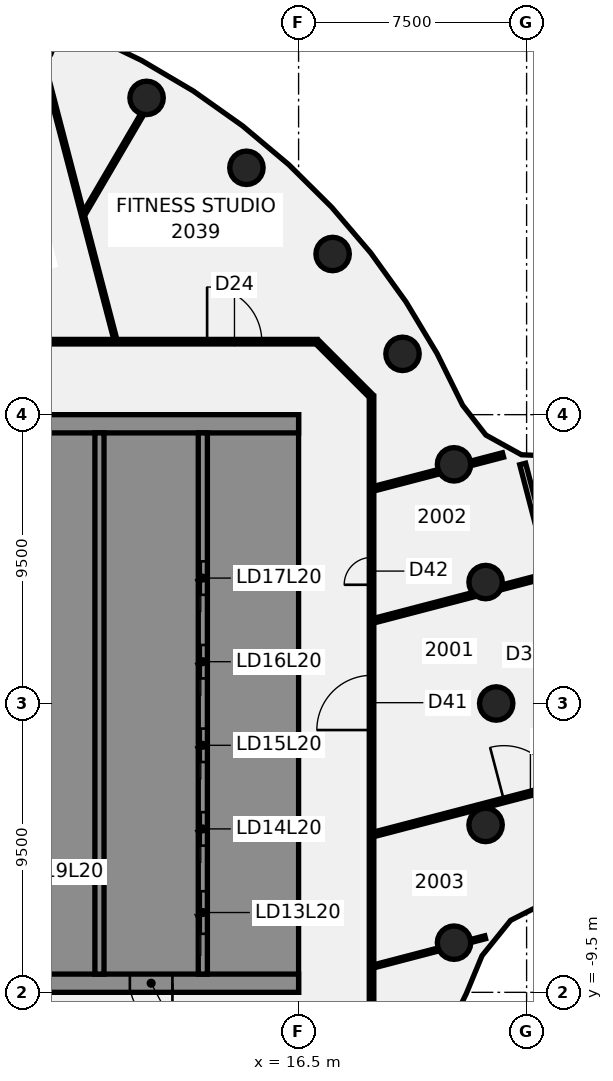
"""IFC4 building model, lengths in metres.
Left out: names, types, materials, properties, quantities, classifications, styles, units other than length and angle.
Written with IfcOpenShell. Run it as: python <this file> out.ifc"""

import sys

from ifc_helpers import new_model, si_unit, direction, frame, frame_2d, origin, origin_2d, place, context, subcontext, project, spatial, polyline, rectangle, circle, outline, extrude, element, fill, save


model = new_model("IFC4")
c1 = context("Model", 3, precision=1e-05, world=origin(), true_north=direction((0.0, 1.0)))
c2 = subcontext(c1, "Body", "Model", "MODEL_VIEW")
j1 = project(units=[si_unit("LENGTHUNIT", "METRE"), si_unit("PLANEANGLEUNIT", "RADIAN")], contexts=[c1])
p1 = place(None, origin())
s1 = spatial("IfcSite", under=j1, at=p1, CompositionType="ELEMENT")
p2 = place(p1, origin())
s2 = spatial("IfcBuilding", under=s1, at=p2, CompositionType="ELEMENT")
p3 = place(p2, frame((0.0, 0.0, 87.25)))
s3 = spatial("IfcBuildingStorey", under=s2, at=p3, CompositionType="ELEMENT", Elevation=87.25)
for number, where, z_axis, x_axis in (
    (1, (23.0, 0.0, -0.14), (0.0, 0.0, 1.0), (1.0, 0.0, 0.0)),
    (2, (22.651, 3.994, -0.14), (0.0, 0.0, 1.0), (1.0, 0.0, 0.0)),
    (3, (21.613, 7.866, -0.14), (0.0, 0.0, 1.0), (1.0, 0.0, 0.0)),
    (4, (19.919, 11.5, -0.14), (0.0, 0.0, 1.0), (1.0, 0.0, 0.0)),
    (5, (17.619, 14.784, -0.14), (0.0, 0.0, 1.0), (1.0, 0.0, 0.0)),
    (6, (14.784, 17.619, -0.14), (0.0, 0.0, 1.0), (1.0, 0.0, 0.0)),
    (7, (11.5, 19.919, -0.14), (0.0, 0.0, 1.0), (1.0, 0.0, 0.0)),
    (8, (7.866, 21.613, -0.14), (0.0, 0.0, 1.0), (1.0, 0.0, 0.0)),
    (9, (21.613, -7.866, -0.14), (0.0, 0.0, 1.0), (1.0, 0.0, 0.0)),
    (10, (22.651, -3.994, -0.14), (0.0, 0.0, 1.0), (1.0, 0.0, 0.0)),
):
    element("IfcColumn", number, at=place(p3, frame(where, z_axis=z_axis, x_axis=x_axis)), inside=s3, PredefinedType="COLUMN", context=c2, shape_type="SweptSolid", body=[
        extrude(circle(Radius=0.55, at=origin_2d()), origin(), (0.0, 0.0, 1.0), 3.75),
    ])
p4 = place(p3, frame((8.087, 21.112, 0.0), z_axis=(0.0, 0.0, 1.0), x_axis=(0.252552298943, -0.967583245152, 0.0)))
e11 = element("IfcWall", 11, at=p4, inside=s3, PredefinedType="PARTITIONING", context=c2, shape_type="SweptSolid", body=[
    extrude(rectangle(XDim=9.45, YDim=0.1, at=frame_2d((4.725, 0.0))), origin(), (0.0, 0.0, 1.0), 3.01),
])
p5 = place(p3, frame((23.871, 7.878, 0.0), z_axis=(0.0, 0.0, 1.0), x_axis=(0.252436249306, -0.967613528242, 0.0)))
e12 = element("IfcWall", 12, at=p5, inside=s3, PredefinedType="PARTITIONING", context=c2, shape_type="SweptSolid", body=[
    extrude(rectangle(XDim=13.849, YDim=0.2, at=frame_2d((6.925, 0.0))), origin(), (0.0, 0.0, 1.0), 3.01),
])
p6 = place(p5, frame((6.55, 0.0, 0.0)))
e13 = element("IfcOpeningElement", 13, at=p6, cuts=e12, PredefinedType="OPENING", context=c2, shape_type="SweptSolid", body=[
    extrude(rectangle(XDim=1.4, YDim=2.1, at=frame_2d((0.7, 1.05))), frame((0.0, 0.11, 0.0), z_axis=(0.0, -1.0, 0.0), x_axis=(1.0, 0.0, 0.0)), (0.0, 0.0, 1.0), 0.22),
])
p7 = place(p3, frame((17.128, 11.872, 0.0), z_axis=(0.0, 0.0, 1.0), x_axis=(0.707106781187, -0.707106781187, 0.0)))
e14 = element("IfcWall", 14, at=p7, inside=s3, PredefinedType="PARTITIONING", context=c2, shape_type="SweptSolid", body=[
    extrude(rectangle(XDim=2.465, YDim=0.15, at=frame_2d((1.232, 0.0))), origin(), (0.0, 0.0, 1.0), 3.01),
])
p8 = place(p3, frame((-17.065, 11.9, 0.0), z_axis=(0.0, 0.0, 1.0), x_axis=(1.0, 0.0, 0.0)))
e15 = element("IfcWall", 15, at=p8, inside=s3, PredefinedType="PARTITIONING", context=c2, shape_type="SweptSolid", body=[
    extrude(rectangle(XDim=34.165, YDim=0.15, at=frame_2d((17.083, 0.0))), origin(), (0.0, 0.0, 1.0), 3.01),
])
p9 = place(p8, frame((18.737, 0.0, 0.0)))
e16 = element("IfcOpeningElement", 16, at=p9, cuts=e15, PredefinedType="OPENING", context=c2, shape_type="SweptSolid", body=[
    extrude(rectangle(XDim=1.8, YDim=2.1, at=frame_2d((0.9, 1.05))), frame((0.0, 0.085, 0.0), z_axis=(0.0, -1.0, 0.0), x_axis=(1.0, 0.0, 0.0)), (0.0, 0.0, 1.0), 0.17),
])
p10 = place(p8, frame((30.556, 0.0, 0.0)))
e17 = element("IfcOpeningElement", 17, at=p10, cuts=e15, PredefinedType="OPENING", context=c2, shape_type="SweptSolid", body=[
    extrude(rectangle(XDim=1.8, YDim=2.1, at=frame_2d((0.9, 1.05))), frame((0.0, 0.085, 0.0), z_axis=(0.0, -1.0, 0.0), x_axis=(1.0, 0.0, 0.0)), (0.0, 0.0, 1.0), 0.17),
])
p11 = place(p8, frame((5.065, 0.0, 0.0)))
e18 = element("IfcOpeningElement", 18, at=p11, cuts=e15, PredefinedType="OPENING", context=c2, shape_type="SweptSolid", body=[
    extrude(rectangle(XDim=1.8, YDim=2.1, at=frame_2d((0.9, 1.05))), frame((0.0, 0.085, 0.0), z_axis=(0.0, -1.0, 0.0), x_axis=(1.0, 0.0, 0.0)), (0.0, 0.0, 1.0), 0.17),
])
p12 = place(p3, frame((18.977, -4.303, 0.0), z_axis=(0.0, 0.0, 1.0), x_axis=(0.967578232692, 0.252571501998, 0.0)))
e19 = element("IfcWall", 19, at=p12, inside=s3, PredefinedType="PARTITIONING", context=c2, shape_type="SweptSolid", body=[
    extrude(rectangle(XDim=7.706, YDim=0.15, at=frame_2d((3.853, 0.0))), origin(), (0.0, 0.0, 1.0), 3.01),
])
p13 = place(p12, frame((4.42, 0.0, 0.0)))
e20 = element("IfcOpeningElement", 20, at=p13, cuts=e19, PredefinedType="OPENING", context=c2, shape_type="SweptSolid", body=[
    extrude(rectangle(XDim=1.8, YDim=2.1, at=frame_2d((0.9, 1.05))), frame((0.0, 0.085, 0.0), z_axis=(0.0, -1.0, 0.0), x_axis=(1.0, 0.0, 0.0)), (0.0, 0.0, 1.0), 0.17),
])
p14 = place(p3, frame((18.977, 2.725, 0.0), z_axis=(0.0, 0.0, 1.0), x_axis=(0.967595308008, 0.252506078978, 0.0)))
e21 = element("IfcWall", 21, at=p14, inside=s3, PredefinedType="PARTITIONING", context=c2, shape_type="SweptSolid", body=[
    extrude(rectangle(XDim=3.424, YDim=0.15, at=frame_2d((1.712, 0.0))), origin(), (0.0, 0.0, 1.0), 3.01),
])
p15 = place(p3, frame((23.163, 3.817, 0.0), z_axis=(0.0, 0.0, 1.0), x_axis=(0.967602777956, 0.25247745264, 0.0)))
e22 = element("IfcWall", 22, at=p15, inside=s3, PredefinedType="PARTITIONING", context=c2, shape_type="SweptSolid", body=[
    extrude(rectangle(XDim=1.61, YDim=0.15, at=frame_2d((0.805, 0.0))), origin(), (0.0, 0.0, 1.0), 3.01),
])
p16 = place(p3, frame((18.977, 7.066, 0.0), z_axis=(0.0, 0.0, 1.0), x_axis=(0.967625475545, 0.252390449655, 0.0)))
e23 = element("IfcWall", 23, at=p16, inside=s3, PredefinedType="PARTITIONING", context=c2, shape_type="SweptSolid", body=[
    extrude(rectangle(XDim=2.212, YDim=0.15, at=frame_2d((1.106, 0.0))), origin(), (0.0, 0.0, 1.0), 3.01),
])
p17 = place(p3, frame((22.165, 7.897, 0.0), z_axis=(0.0, 0.0, 1.0), x_axis=(0.967626742391, 0.252385592716, 0.0)))
e24 = element("IfcWall", 24, at=p17, inside=s3, PredefinedType="PARTITIONING", context=c2, shape_type="SweptSolid", body=[
    extrude(rectangle(XDim=1.095, YDim=0.15, at=frame_2d((0.547, 0.0))), origin(), (0.0, 0.0, 1.0), 3.01),
])
p18 = place(p3, frame((18.968, -8.646, 0.0), z_axis=(0.0, 0.0, 1.0), x_axis=(0.967589185471, 0.252529539182, 0.0)))
e25 = element("IfcWall", 25, at=p18, inside=s3, PredefinedType="PARTITIONING", context=c2, shape_type="SweptSolid", body=[
    extrude(rectangle(XDim=2.216, YDim=0.1, at=frame_2d((1.108, 0.0))), origin(), (0.0, 0.0, 1.0), 3.01),
])
p19 = place(p3, frame((22.159, -7.813, 0.0), z_axis=(0.0, 0.0, 1.0), x_axis=(0.967507265898, 0.252843213146, 0.0)))
e26 = element("IfcWall", 26, at=p19, inside=s3, PredefinedType="PARTITIONING", context=c2, shape_type="SweptSolid", body=[
    extrude(rectangle(XDim=0.495, YDim=0.1, at=frame_2d((0.248, 0.0))), origin(), (0.0, 0.0, 1.0), 3.01),
])
p20 = place(p3, frame((9.457, 16.137, 0.0), z_axis=(0.0, 0.0, 1.0), x_axis=(0.505643154542, 0.862742719624, 0.0)))
e27 = element("IfcWall", 27, at=p20, inside=s3, PredefinedType="PARTITIONING", context=c2, shape_type="SweptSolid", body=[
    extrude(rectangle(XDim=3.775, YDim=0.1, at=frame_2d((1.888, 0.0))), origin(), (0.0, 0.0, 1.0), 3.01),
])
p21 = place(p3, frame((18.9, -10.1, 0.0), z_axis=(0.0, 0.0, 1.0), x_axis=(0.0, 1.0, 0.0)))
e28 = element("IfcWall", 28, at=p21, inside=s3, PredefinedType="PARTITIONING", context=c2, shape_type="SweptSolid", body=[
    extrude(rectangle(XDim=20.2, YDim=0.15, at=frame_2d((10.1, 0.0))), origin(), (0.0, 0.0, 1.0), 3.01),
])
p22 = place(p21, frame((9.227, 0.0, 0.0)))
e29 = element("IfcOpeningElement", 29, at=p22, cuts=e28, PredefinedType="OPENING", context=c2, shape_type="SweptSolid", body=[
    extrude(rectangle(XDim=1.8, YDim=2.1, at=frame_2d((0.9, 1.05))), frame((0.0, 0.085, 0.0), z_axis=(0.0, -1.0, 0.0), x_axis=(1.0, 0.0, 0.0)), (0.0, 0.0, 1.0), 0.17),
])
p23 = place(p21, frame((14.005, 0.0, 0.0)))
e30 = element("IfcOpeningElement", 30, at=p23, cuts=e28, PredefinedType="OPENING", context=c2, shape_type="SweptSolid", body=[
    extrude(rectangle(XDim=0.9, YDim=2.1, at=frame_2d((0.45, 1.05))), frame((0.0, 0.085, 0.0), z_axis=(0.0, -1.0, 0.0), x_axis=(1.0, 0.0, 0.0)), (0.0, 0.0, 1.0), 0.17),
])
p24 = place(p3, frame((16.5, -9.2, 0.0), z_axis=(0.0, 0.0, 1.0), x_axis=(-1.0, 0.0, 0.0)))
e31 = element("IfcWall", 31, at=p24, inside=s3, PredefinedType="SHEAR", context=c2, shape_type="SweptSolid", body=[
    extrude(rectangle(XDim=13.0, YDim=0.6, at=frame_2d((6.5, 0.0))), origin(), (0.0, 0.0, 1.0), 3.61),
])
p25 = place(p24, frame((4.15, 0.0, 0.0)))
e32 = element("IfcOpeningElement", 32, at=p25, cuts=e31, PredefinedType="OPENING", context=c2, shape_type="SweptSolid", body=[
    extrude(rectangle(XDim=1.4, YDim=2.1, at=frame_2d((0.7, 1.05))), frame((0.0, 0.31, 0.0), z_axis=(0.0, -1.0, 0.0), x_axis=(1.0, 0.0, 0.0)), (0.0, 0.0, 1.0), 0.62),
])
p26 = place(p24, frame((10.125, 0.0, 0.0)))
e33 = element("IfcOpeningElement", 33, at=p26, cuts=e31, PredefinedType="OPENING", context=c2, shape_type="SweptSolid", body=[
    extrude(rectangle(XDim=1.4, YDim=2.1, at=frame_2d((0.7, 1.05))), frame((0.0, 0.31, 0.0), z_axis=(0.0, -1.0, 0.0), x_axis=(1.0, 0.0, 0.0)), (0.0, 0.0, 1.0), 0.62),
])
p27 = place(p3, origin())
e34 = element("IfcWall", 34, at=p27, inside=s3, PredefinedType="SHEAR", context=c2, shape_type="SweptSolid", body=[
    extrude(outline(polyline([(13.5, -8.9), (15.9, -8.9), (16.5, -8.9), (16.5, 8.9), (15.9, 8.9), (13.5, 8.9), (13.5, 8.125), (15.9, 8.125), (15.9, 5.625), (13.5, 5.625), (13.5, 5.375), (15.9, 5.375), (15.9, 2.875), (13.5, 2.875), (13.5, 2.625), (15.9, 2.625), (15.9, 0.125), (13.5, 0.125), (13.5, -0.125), (15.9, -0.125), (15.9, -2.625), (13.5, -2.625), (13.5, -2.875), (15.9, -2.875), (15.9, -5.375), (13.5, -5.375), (13.5, -5.625), (15.9, -5.625), (15.9, -8.125), (13.5, -8.125), (13.5, -8.9)])), origin(), (0.0, 0.0, 1.0), 3.61),
])
p28 = place(p3, frame((16.5, 9.2, 0.0), z_axis=(0.0, 0.0, 1.0), x_axis=(-1.0, 0.0, 0.0)))
e35 = element("IfcWall", 35, at=p28, inside=s3, PredefinedType="SHEAR", context=c2, shape_type="SweptSolid", body=[
    extrude(rectangle(XDim=13.0, YDim=0.6, at=frame_2d((6.5, 0.0))), origin(), (0.0, 0.0, 1.0), 3.61),
])
p29 = place(p3, origin())
e36 = element("IfcWall", 36, at=p29, inside=s3, PredefinedType="SHEAR", context=c2, shape_type="SweptSolid", body=[
    extrude(outline(polyline([(9.8, -5.375), (7.5, -5.375), (7.5, -2.875), (9.8, -2.875), (9.8, -2.625), (7.5, -2.625), (7.5, -0.125), (9.8, -0.125), (9.8, 0.125), (7.5, 0.125), (7.5, 2.625), (9.8, 2.625), (9.8, 2.875), (7.5, 2.875), (7.5, 5.375), (9.8, 5.375), (9.8, 5.625), (7.5, 5.625), (7.5, 8.125), (9.8, 8.125), (9.8, 8.9), (7.5, 8.9), (7.2, 8.9), (7.2, -5.625), (7.5, -5.625), (9.8, -5.625), (9.8, -5.375)])), origin(), (0.0, 0.0, 1.0), 3.61),
])
p30 = place(p3, origin())
e37 = element("IfcWall", 37, at=p30, inside=s3, PredefinedType="SHEAR", context=c2, shape_type="SweptSolid", body=[
    extrude(outline(polyline([(7.5, -8.125), (7.5, -8.9), (9.8, -8.9), (9.8, -8.125), (9.8, -5.625), (9.55, -5.625), (9.55, -8.125), (7.5, -8.125)])), origin(), (0.0, 0.0, 1.0), 3.61),
])
p31 = place(p3, frame((13.35, -8.9, 0.0), z_axis=(0.0, 0.0, 1.0), x_axis=(0.0, 1.0, 0.0)))
e38 = element("IfcWall", 38, at=p31, inside=s3, PredefinedType="SHEAR", context=c2, shape_type="SweptSolid", body=[
    extrude(rectangle(XDim=17.8, YDim=0.3, at=frame_2d((8.9, 0.0))), origin(), (0.0, 0.0, 1.0), 3.61),
])
p32 = place(p31, frame((1.325, 0.0, 0.0)))
e39 = element("IfcOpeningElement", 39, at=p32, cuts=e38, PredefinedType="OPENING", context=c2, shape_type="SweptSolid", body=[
    extrude(rectangle(XDim=1.4, YDim=2.1, at=frame_2d((0.7, 1.05))), frame((0.0, 0.16, 0.0), z_axis=(0.0, -1.0, 0.0), x_axis=(1.0, 0.0, 0.0)), (0.0, 0.0, 1.0), 0.32),
])
p33 = place(p31, frame((4.225, 0.0, 0.0)))
e40 = element("IfcOpeningElement", 40, at=p33, cuts=e38, PredefinedType="OPENING", context=c2, shape_type="SweptSolid", body=[
    extrude(rectangle(XDim=1.1, YDim=2.1, at=frame_2d((0.55, 1.05))), frame((0.0, 0.16, 0.0), z_axis=(0.0, -1.0, 0.0), x_axis=(1.0, 0.0, 0.0)), (0.0, 0.0, 1.0), 0.32),
])
p34 = place(p31, frame((6.975, 0.0, 0.0)))
e41 = element("IfcOpeningElement", 41, at=p34, cuts=e38, PredefinedType="OPENING", context=c2, shape_type="SweptSolid", body=[
    extrude(rectangle(XDim=1.1, YDim=2.1, at=frame_2d((0.55, 1.05))), frame((0.0, 0.16, 0.0), z_axis=(0.0, -1.0, 0.0), x_axis=(1.0, 0.0, 0.0)), (0.0, 0.0, 1.0), 0.32),
])
p35 = place(p31, frame((9.725, 0.0, 0.0)))
e42 = element("IfcOpeningElement", 42, at=p35, cuts=e38, PredefinedType="OPENING", context=c2, shape_type="SweptSolid", body=[
    extrude(rectangle(XDim=1.1, YDim=2.1, at=frame_2d((0.55, 1.05))), frame((0.0, 0.16, 0.0), z_axis=(0.0, -1.0, 0.0), x_axis=(1.0, 0.0, 0.0)), (0.0, 0.0, 1.0), 0.32),
])
p36 = place(p31, frame((12.475, 0.0, 0.0)))
e43 = element("IfcOpeningElement", 43, at=p36, cuts=e38, PredefinedType="OPENING", context=c2, shape_type="SweptSolid", body=[
    extrude(rectangle(XDim=1.1, YDim=2.1, at=frame_2d((0.55, 1.05))), frame((0.0, 0.16, 0.0), z_axis=(0.0, -1.0, 0.0), x_axis=(1.0, 0.0, 0.0)), (0.0, 0.0, 1.0), 0.32),
])
p37 = place(p3, frame((9.95, -8.9, 0.0), z_axis=(0.0, 0.0, 1.0), x_axis=(0.0, 1.0, 0.0)))
e44 = element("IfcWall", 44, at=p37, inside=s3, PredefinedType="SHEAR", context=c2, shape_type="SweptSolid", body=[
    extrude(rectangle(XDim=17.8, YDim=0.3, at=frame_2d((8.9, 0.0))), origin(), (0.0, 0.0, 1.0), 3.61),
])
p38 = place(p10, origin())
e45 = element("IfcDoor", 45, at=p38, inside=s3, OperationType="DOUBLE_DOOR_SINGLE_SWING", PredefinedType="DOOR", context=c2, shape_type="SweptSolid", body=[
    extrude(rectangle(XDim=1.8, YDim=2.1, at=frame_2d((0.9, 1.05))), frame((0.0, 0.025, 0.0), z_axis=(0.0, -1.0, 0.0), x_axis=(1.0, 0.0, 0.0)), (0.0, 0.0, 1.0), 0.05),
])
fill(e17, e45)
p39 = place(p13, frame((1.8, 0.0, 0.0), z_axis=(0.0, 0.0, 1.0), x_axis=(-1.0, 0.0, 0.0)))
e46 = element("IfcDoor", 46, at=p39, inside=s3, OperationType="DOUBLE_DOOR_SINGLE_SWING", PredefinedType="DOOR", context=c2, shape_type="SweptSolid", body=[
    extrude(rectangle(XDim=1.8, YDim=2.1, at=frame_2d((0.9, 1.05))), frame((0.0, 0.025, 0.0), z_axis=(0.0, -1.0, 0.0), x_axis=(1.0, 0.0, 0.0)), (0.0, 0.0, 1.0), 0.05),
])
fill(e20, e46)
p40 = place(p22, origin())
e47 = element("IfcDoor", 47, at=p40, inside=s3, OperationType="DOUBLE_DOOR_SINGLE_SWING", PredefinedType="DOOR", context=c2, shape_type="SweptSolid", body=[
    extrude(rectangle(XDim=1.8, YDim=2.1, at=frame_2d((0.9, 1.05))), frame((0.0, 0.025, 0.0), z_axis=(0.0, -1.0, 0.0), x_axis=(1.0, 0.0, 0.0)), (0.0, 0.0, 1.0), 0.05),
])
fill(e29, e47)
p41 = place(p23, frame((0.9, 0.0, 0.0), z_axis=(0.0, 0.0, 1.0), x_axis=(-1.0, 0.0, 0.0)))
e48 = element("IfcDoor", 48, at=p41, inside=s3, OperationType="SINGLE_SWING_RIGHT", PredefinedType="DOOR", context=c2, shape_type="SweptSolid", body=[
    extrude(rectangle(XDim=0.9, YDim=2.1, at=frame_2d((0.45, 1.05))), frame((0.0, 0.025, 0.0), z_axis=(0.0, -1.0, 0.0), x_axis=(1.0, 0.0, 0.0)), (0.0, 0.0, 1.0), 0.05),
])
fill(e30, e48)
p42 = place(p25, origin())
e49 = element("IfcDoor", 49, at=p42, inside=s3, OperationType="SINGLE_SWING_LEFT", PredefinedType="DOOR", context=c2, shape_type="SweptSolid", body=[
    extrude(rectangle(XDim=1.4, YDim=2.1, at=frame_2d((0.7, 1.05))), frame((0.0, 0.025, 0.0), z_axis=(0.0, -1.0, 0.0), x_axis=(1.0, 0.0, 0.0)), (0.0, 0.0, 1.0), 0.05),
])
fill(e32, e49)
p43 = place(p32, origin())
e50 = element("IfcDoor", 50, at=p43, inside=s3, OperationType="SLIDING_TO_LEFT", PredefinedType="DOOR", context=c2, shape_type="SweptSolid", body=[
    extrude(rectangle(XDim=1.4, YDim=2.1, at=frame_2d((0.7, 1.05))), frame((0.0, 0.025, 0.0), z_axis=(0.0, -1.0, 0.0), x_axis=(1.0, 0.0, 0.0)), (0.0, 0.0, 1.0), 0.05),
])
fill(e39, e50)
p44 = place(p33, origin())
e51 = element("IfcDoor", 51, at=p44, inside=s3, OperationType="SLIDING_TO_LEFT", PredefinedType="DOOR", context=c2, shape_type="SweptSolid", body=[
    extrude(rectangle(XDim=1.1, YDim=2.1, at=frame_2d((0.55, 1.05))), frame((0.0, 0.025, 0.0), z_axis=(0.0, -1.0, 0.0), x_axis=(1.0, 0.0, 0.0)), (0.0, 0.0, 1.0), 0.05),
])
fill(e40, e51)
p45 = place(p34, origin())
e52 = element("IfcDoor", 52, at=p45, inside=s3, OperationType="SLIDING_TO_LEFT", PredefinedType="DOOR", context=c2, shape_type="SweptSolid", body=[
    extrude(rectangle(XDim=1.1, YDim=2.1, at=frame_2d((0.55, 1.05))), frame((0.0, 0.025, 0.0), z_axis=(0.0, -1.0, 0.0), x_axis=(1.0, 0.0, 0.0)), (0.0, 0.0, 1.0), 0.05),
])
fill(e41, e52)
p46 = place(p35, origin())
e53 = element("IfcDoor", 53, at=p46, inside=s3, OperationType="SLIDING_TO_LEFT", PredefinedType="DOOR", context=c2, shape_type="SweptSolid", body=[
    extrude(rectangle(XDim=1.1, YDim=2.1, at=frame_2d((0.55, 1.05))), frame((0.0, 0.025, 0.0), z_axis=(0.0, -1.0, 0.0), x_axis=(1.0, 0.0, 0.0)), (0.0, 0.0, 1.0), 0.05),
])
fill(e42, e53)
p47 = place(p36, origin())
e54 = element("IfcDoor", 54, at=p47, inside=s3, OperationType="SLIDING_TO_LEFT", PredefinedType="DOOR", context=c2, shape_type="SweptSolid", body=[
    extrude(rectangle(XDim=1.1, YDim=2.1, at=frame_2d((0.55, 1.05))), frame((0.0, 0.025, 0.0), z_axis=(0.0, -1.0, 0.0), x_axis=(1.0, 0.0, 0.0)), (0.0, 0.0, 1.0), 0.05),
])
fill(e43, e54)
save(model, sys.argv[1])
